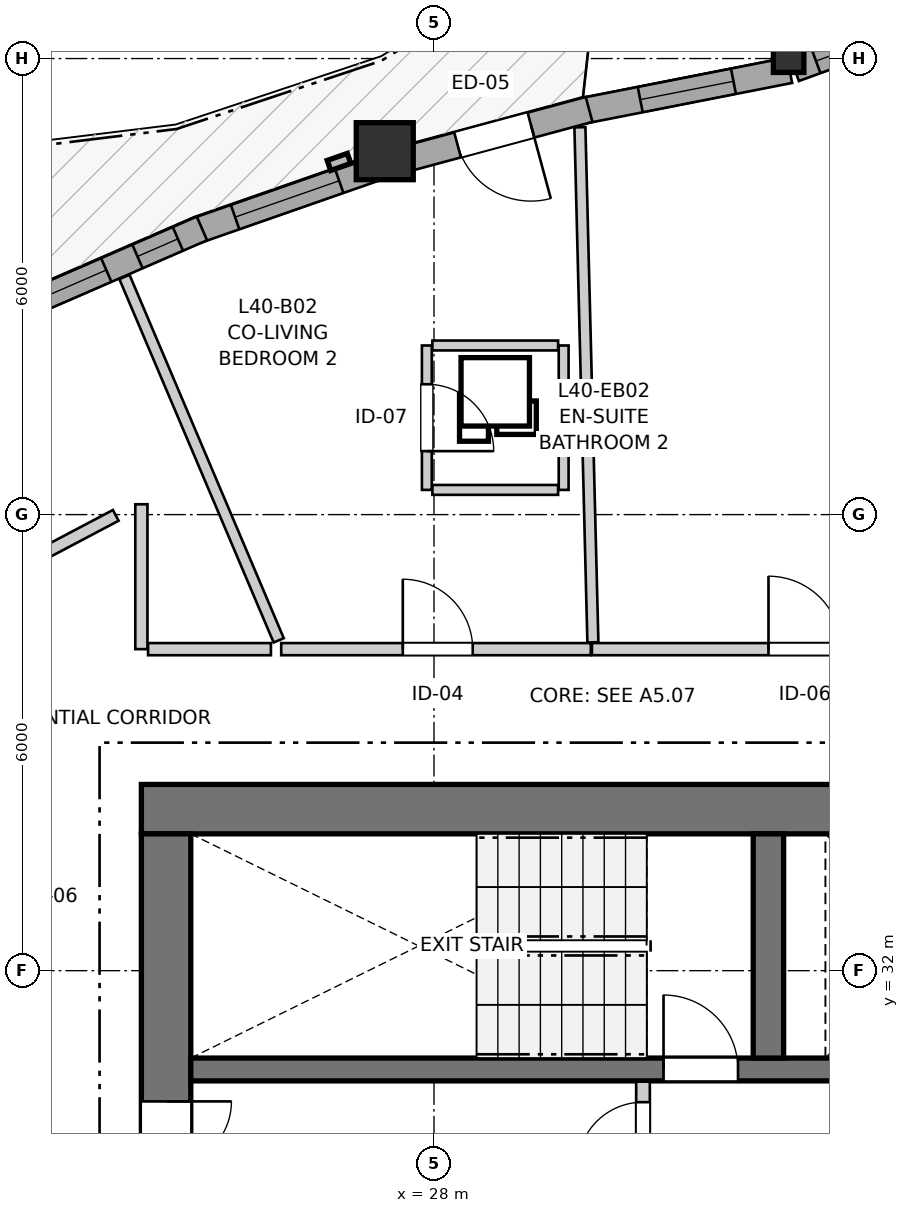
"""IFC4 building model, lengths in metres.
Left out: names, types, materials, properties, quantities, classifications, styles, units other than length and angle.
Written with IfcOpenShell. Run it as: python <this file> out.ifc"""

import sys

from ifc_helpers import new_model, si_unit, direction, frame, frame_2d, origin, origin_2d, place, context, subcontext, project, spatial, rectangle, i_section, extrude, source, transform, mapped, element, fill, save


model = new_model("IFC4")
c1 = context("Model", 3, precision=1e-05, world=origin(), true_north=direction((0.0, 1.0)))
c2 = subcontext(c1, "Body", "Model", "MODEL_VIEW")
j1 = project(units=[si_unit("LENGTHUNIT", "METRE"), si_unit("PLANEANGLEUNIT", "RADIAN")], contexts=[c1])
p1 = place(None, origin())
s1 = spatial("IfcSite", under=j1, at=p1, CompositionType="ELEMENT")
p2 = place(p1, origin())
s2 = spatial("IfcBuilding", under=s1, at=p2, CompositionType="ELEMENT")
p3 = place(p2, frame((0.0, 0.0, 136.2)))
s3 = spatial("IfcBuildingStorey", under=s2, at=p3, CompositionType="ELEMENT", Elevation=136.2)
p4 = place(p3, frame((36.55, 34.125, 0.0), z_axis=(0.0, 0.0, 1.0), x_axis=(-1.0, 0.0, 0.0)))
e1 = element("IfcWall", 1, at=p4, inside=s3, PredefinedType="SHEAR", context=c2, shape_type="SweptSolid", body=[
    extrude(rectangle(XDim=12.4, YDim=0.65, at=frame_2d((6.2, 0.0))), origin(), (0.0, 0.0, 1.0), 2.95),
])
p5 = place(p3, frame((24.475, 33.8, 0.0), z_axis=(0.0, 0.0, 1.0), x_axis=(0.0, -1.0, 0.0)))
e2 = element("IfcWall", 2, at=p5, inside=s3, PredefinedType="SHEAR", context=c2, shape_type="SweptSolid", body=[
    extrude(rectangle(XDim=15.6, YDim=0.65, at=frame_2d((7.8, 0.0))), origin(), (0.0, 0.0, 1.0), 2.95),
])
p6 = place(p5, frame((7.05, 0.0, 0.0)))
e3 = element("IfcOpeningElement", 3, at=p6, cuts=e2, PredefinedType="OPENING", context=c2, shape_type="SweptSolid", body=[
    extrude(rectangle(XDim=1.5, YDim=2.15, at=frame_2d((0.75, 1.075))), frame((0.0, 0.335, 0.0), z_axis=(0.0, -1.0, 0.0), x_axis=(1.0, 0.0, 0.0)), (0.0, 0.0, 1.0), 0.67),
])
p7 = place(p5, frame((3.52, 0.0, 0.0)))
e4 = element("IfcOpeningElement", 4, at=p7, cuts=e2, PredefinedType="OPENING", context=c2, shape_type="SweptSolid", body=[
    extrude(rectangle(XDim=0.86, YDim=2.05, at=frame_2d((0.43, 1.025))), frame((0.0, 0.335, 0.0), z_axis=(0.0, -1.0, 0.0), x_axis=(1.0, 0.0, 0.0)), (0.0, 0.0, 1.0), 0.67),
])
p8 = place(p5, frame((11.22, 0.0, 0.0)))
e5 = element("IfcOpeningElement", 5, at=p8, cuts=e2, PredefinedType="OPENING", context=c2, shape_type="SweptSolid", body=[
    extrude(rectangle(XDim=0.86, YDim=2.05, at=frame_2d((0.43, 1.025))), frame((0.0, 0.335, 0.0), z_axis=(0.0, -1.0, 0.0), x_axis=(1.0, 0.0, 0.0)), (0.0, 0.0, 1.0), 0.67),
])
p9 = place(p3, frame((24.8, 30.7, 0.0), z_axis=(0.0, 0.0, 1.0), x_axis=(1.0, 0.0, 0.0)))
e6 = element("IfcWall", 6, at=p9, inside=s3, PredefinedType="SHEAR", context=c2, shape_type="SweptSolid", body=[
    extrude(rectangle(XDim=11.1, YDim=0.3, at=frame_2d((5.55, 0.0))), origin(), (0.0, 0.0, 1.0), 2.95),
])
p10 = place(p9, frame((6.22, 0.0, 0.0)))
e7 = element("IfcOpeningElement", 7, at=p10, cuts=e6, PredefinedType="OPENING", context=c2, shape_type="SweptSolid", body=[
    extrude(rectangle(XDim=0.98, YDim=2.15, at=frame_2d((0.49, 1.075))), frame((0.0, 0.16, 0.0), z_axis=(0.0, -1.0, 0.0), x_axis=(1.0, 0.0, 0.0)), (0.0, 0.0, 1.0), 0.32),
])
p11 = place(p9, frame((9.15, 0.0, 0.0)))
e8 = element("IfcOpeningElement", 8, at=p11, cuts=e6, PredefinedType="OPENING", context=c2, shape_type="SweptSolid", body=[
    extrude(rectangle(XDim=1.15, YDim=2.15, at=frame_2d((0.575, 1.075))), frame((0.0, 0.16, 0.0), z_axis=(0.0, -1.0, 0.0), x_axis=(1.0, 0.0, 0.0)), (0.0, 0.0, 1.0), 0.32),
])
p12 = place(p3, frame((32.4, 30.85, 0.0), z_axis=(0.0, 0.0, 1.0), x_axis=(0.0, 1.0, 0.0)))
e9 = element("IfcWall", 9, at=p12, inside=s3, PredefinedType="SHEAR", context=c2, shape_type="SweptSolid", body=[
    extrude(rectangle(XDim=2.95, YDim=0.4, at=frame_2d((1.475, 0.0))), origin(), (0.0, 0.0, 1.0), 2.95),
])
m1 = source(origin(), c2, "Body", "SweptSolid", [
    extrude(i_section(OverallWidth=0.401, OverallDepth=0.399, WebThickness=0.023, FlangeThickness=0.036, FilletRadius=0.015, at=origin_2d()), origin(), (0.0, 0.0, 1.0), 2.95),
])
p13 = place(p3, frame((32.666, 44.017, 0.0), z_axis=(0.0, 0.0, 1.0), x_axis=(1.0, 0.0, 0.0)))
e10 = element("IfcColumn", 10, at=p13, inside=s3, PredefinedType="PILASTER", context=c2, shape_type="MappedRepresentation", body=[
    mapped(m1, transform((0.0, 0.0, 0.0), x_axis=(1.0, 0.0, 0.0), y_axis=(0.0, 1.0, 0.0), z_axis=(0.0, 0.0, 1.0), scale=1.0)),
])
m2 = source(origin(), c2, "Body", "SweptSolid", [
    extrude(rectangle(XDim=0.75, YDim=0.75, at=origin_2d()), origin(), (0.0, 0.0, 1.0), 2.95),
])
p14 = place(p3, frame((27.352, 42.781, 0.0), z_axis=(0.0, 0.0, 1.0), x_axis=(1.0, 0.0, 0.0)))
e11 = element("IfcColumn", 11, at=p14, inside=s3, PredefinedType="COLUMN", context=c2, shape_type="MappedRepresentation", body=[
    mapped(m2, transform((0.0, 0.0, 0.0), x_axis=(1.0, 0.0, 0.0), y_axis=(0.0, 1.0, 0.0), z_axis=(0.0, 0.0, 1.0), scale=1.0)),
])
p15 = place(p3, frame((34.644, 44.557, 0.0), z_axis=(0.0, 0.0, 1.0), x_axis=(-0.939440593615, -0.342711790092, 0.0)))
e12 = element("IfcWall", 12, at=p15, inside=s3, PredefinedType="SOLIDWALL", context=c2, shape_type="SweptSolid", body=[
    extrude(rectangle(XDim=2.023, YDim=0.34, at=frame_2d((1.012, 0.0))), origin(), (0.0, 0.0, 1.0), 2.53),
])
p16 = place(p15, frame((0.322, 0.0, 0.82)))
e13 = element("IfcOpeningElement", 13, at=p16, cuts=e12, PredefinedType="OPENING", context=c2, shape_type="SweptSolid", body=[
    extrude(rectangle(XDim=1.4, YDim=1.35, at=frame_2d((0.7, 0.675))), frame((0.0, 0.18, 0.0), z_axis=(0.0, -1.0, 0.0), x_axis=(1.0, 0.0, 0.0)), (0.0, 0.0, 1.0), 0.36),
])
p17 = place(p3, frame((32.679, 43.846, 0.0), z_axis=(0.0, 0.0, 1.0), x_axis=(-0.981247929568, -0.192749839736, 0.0)))
e14 = element("IfcWall", 14, at=p17, inside=s3, PredefinedType="SOLIDWALL", context=c2, shape_type="SweptSolid", body=[
    extrude(rectangle(XDim=2.776, YDim=0.34, at=frame_2d((1.388, 0.0))), origin(), (0.0, 0.0, 1.0), 2.53),
])
p18 = place(p17, frame((0.753, 0.0, 0.82)))
e15 = element("IfcOpeningElement", 15, at=p18, cuts=e14, PredefinedType="OPENING", context=c2, shape_type="SweptSolid", body=[
    extrude(rectangle(XDim=1.25, YDim=1.35, at=frame_2d((0.625, 0.675))), frame((0.0, 0.18, 0.0), z_axis=(0.0, -1.0, 0.0), x_axis=(1.0, 0.0, 0.0)), (0.0, 0.0, 1.0), 0.36),
])
p19 = place(p3, frame((30.04, 43.331, 0.0), z_axis=(0.0, 0.0, 1.0), x_axis=(-0.965460468502, -0.260549580233, 0.0)))
e16 = element("IfcWall", 16, at=p19, inside=s3, PredefinedType="SOLIDWALL", context=c2, shape_type="SweptSolid", body=[
    extrude(rectangle(XDim=2.583, YDim=0.34, at=frame_2d((1.292, 0.0))), origin(), (0.0, 0.0, 1.0), 2.53),
])
p20 = place(p19, frame((0.792, 0.0, 0.0)))
e17 = element("IfcOpeningElement", 17, at=p20, cuts=e16, PredefinedType="OPENING", context=c2, shape_type="SweptSolid", body=[
    extrude(rectangle(XDim=1.0, YDim=2.1, at=frame_2d((0.5, 1.05))), frame((0.0, 0.18, 0.0), z_axis=(0.0, -1.0, 0.0), x_axis=(1.0, 0.0, 0.0)), (0.0, 0.0, 1.0), 0.36),
])
p21 = place(p3, frame((27.262, 42.57, 0.0), z_axis=(0.0, 0.0, 1.0), x_axis=(-0.944148723561, -0.329519631884, 0.0)))
e18 = element("IfcWall", 18, at=p21, inside=s3, PredefinedType="SOLIDWALL", context=c2, shape_type="SweptSolid", body=[
    extrude(rectangle(XDim=2.54, YDim=0.34, at=frame_2d((1.27, 0.0))), origin(), (0.0, 0.0, 1.0), 2.53),
])
p22 = place(p21, frame((0.54, 0.0, 0.82)))
e19 = element("IfcOpeningElement", 19, at=p22, cuts=e18, PredefinedType="OPENING", context=c2, shape_type="SweptSolid", body=[
    extrude(rectangle(XDim=1.45, YDim=1.25, at=frame_2d((0.725, 0.625))), frame((0.0, 0.18, 0.0), z_axis=(0.0, -1.0, 0.0), x_axis=(1.0, 0.0, 0.0)), (0.0, 0.0, 1.0), 0.36),
])
p23 = place(p3, frame((24.947, 41.765, 0.0), z_axis=(0.0, 0.0, 1.0), x_axis=(-0.917074459221, -0.398715984435, 0.0)))
e20 = element("IfcWall", 20, at=p23, inside=s3, PredefinedType="SOLIDWALL", context=c2, shape_type="SweptSolid", body=[
    extrude(rectangle(XDim=2.645, YDim=0.34, at=frame_2d((1.322, 0.0))), origin(), (0.0, 0.0, 1.0), 2.53),
])
p24 = place(p23, frame((0.344, 0.0, 0.82)))
e21 = element("IfcOpeningElement", 21, at=p24, cuts=e20, PredefinedType="OPENING", context=c2, shape_type="SweptSolid", body=[
    extrude(rectangle(XDim=0.58, YDim=1.35, at=frame_2d((0.29, 0.675))), frame((0.0, 0.18, 0.0), z_axis=(0.0, -1.0, 0.0), x_axis=(1.0, 0.0, 0.0)), (0.0, 0.0, 1.0), 0.36),
])
p25 = place(p23, frame((1.372, 0.0, 0.82)))
e22 = element("IfcOpeningElement", 22, at=p25, cuts=e20, PredefinedType="OPENING", context=c2, shape_type="SweptSolid", body=[
    extrude(rectangle(XDim=0.95, YDim=1.35, at=frame_2d((0.475, 0.675))), frame((0.0, 0.18, 0.0), z_axis=(0.0, -1.0, 0.0), x_axis=(1.0, 0.0, 0.0)), (0.0, 0.0, 1.0), 0.36),
])
p26 = place(p3, frame((30.75, 27.43, 0.0), z_axis=(0.0, 0.0, 1.0), x_axis=(0.0, 1.0, 0.0)))
e23 = element("IfcWall", 23, at=p26, inside=s3, PredefinedType="PARTITIONING", context=c2, shape_type="SweptSolid", body=[
    extrude(rectangle(XDim=3.11, YDim=0.18, at=frame_2d((1.555, 0.0))), origin(), (0.0, 0.0, 1.0), 2.95),
])
p27 = place(p26, frame((1.98, 0.0, 0.0)))
e24 = element("IfcOpeningElement", 24, at=p27, cuts=e23, PredefinedType="OPENING", context=c2, shape_type="SweptSolid", body=[
    extrude(rectangle(XDim=0.86, YDim=2.05, at=frame_2d((0.43, 1.025))), frame((0.0, 0.1, 0.0), z_axis=(0.0, -1.0, 0.0), x_axis=(1.0, 0.0, 0.0)), (0.0, 0.0, 1.0), 0.2),
])
p28 = place(p3, frame((30.078, 36.23, 0.0), z_axis=(0.0, 0.0, 1.0), x_axis=(1.0, 0.0, 0.0)))
e25 = element("IfcWall", 25, at=p28, inside=s3, PredefinedType="PARTITIONING", context=c2, shape_type="SweptSolid", body=[
    extrude(rectangle(XDim=5.608, YDim=0.16, at=frame_2d((2.804, 0.0))), origin(), (0.0, 0.0, 1.0), 2.588),
])
p29 = place(p28, frame((2.323, 0.0, 0.0)))
e26 = element("IfcOpeningElement", 26, at=p29, cuts=e25, PredefinedType="OPENING", context=c2, shape_type="SweptSolid", body=[
    extrude(rectangle(XDim=0.96, YDim=2.1, at=frame_2d((0.48, 1.05))), frame((0.0, 0.09, 0.0), z_axis=(0.0, -1.0, 0.0), x_axis=(1.0, 0.0, 0.0)), (0.0, 0.0, 1.0), 0.18),
])
p30 = place(p3, frame((25.99, 36.23, 0.0), z_axis=(0.0, 0.0, 1.0), x_axis=(1.0, 0.0, 0.0)))
e27 = element("IfcWall", 27, at=p30, inside=s3, PredefinedType="PARTITIONING", context=c2, shape_type="SweptSolid", body=[
    extrude(rectangle(XDim=4.073, YDim=0.16, at=frame_2d((2.037, 0.0))), origin(), (0.0, 0.0, 1.0), 2.95),
])
p31 = place(p30, frame((1.6, 0.0, 0.0)))
e28 = element("IfcOpeningElement", 28, at=p31, cuts=e27, PredefinedType="OPENING", context=c2, shape_type="SweptSolid", body=[
    extrude(rectangle(XDim=0.92, YDim=2.1, at=frame_2d((0.46, 1.05))), frame((0.0, 0.09, 0.0), z_axis=(0.0, -1.0, 0.0), x_axis=(1.0, 0.0, 0.0)), (0.0, 0.0, 1.0), 0.18),
])
p32 = place(p3, frame((27.906, 40.225, 0.0), z_axis=(0.0, 0.0, 1.0), x_axis=(0.0, -1.0, 0.0)))
e29 = element("IfcWall", 29, at=p32, inside=s3, PredefinedType="PARTITIONING", context=c2, shape_type="SweptSolid", body=[
    extrude(rectangle(XDim=1.9, YDim=0.13, at=frame_2d((0.95, 0.0))), origin(), (0.0, 0.0, 1.0), 2.318),
])
p33 = place(p32, frame((0.51, 0.0, 0.0)))
e30 = element("IfcOpeningElement", 30, at=p33, cuts=e29, PredefinedType="OPENING", context=c2, shape_type="SweptSolid", body=[
    extrude(rectangle(XDim=0.88, YDim=2.05, at=frame_2d((0.44, 1.025))), frame((0.0, 0.075, 0.0), z_axis=(0.0, -1.0, 0.0), x_axis=(1.0, 0.0, 0.0)), (0.0, 0.0, 1.0), 0.15),
])
p34 = place(p3, frame((29.92, 43.096, 0.0), z_axis=(0.0, 0.0, 1.0), x_axis=(0.025211755772, -0.999682133166, 0.0)))
e31 = element("IfcWall", 31, at=p34, inside=s3, PredefinedType="PARTITIONING", context=c2, shape_type="SweptSolid", body=[
    extrude(rectangle(XDim=6.779, YDim=0.145, at=frame_2d((3.389, 0.0))), origin(), (0.0, 0.0, 1.0), 2.95),
])
p35 = place(p3, frame((23.927, 41.127, 0.0), z_axis=(0.0, 0.0, 1.0), x_axis=(0.39073452171, -0.920503413108, 0.0)))
e32 = element("IfcWall", 32, at=p35, inside=s3, PredefinedType="PARTITIONING", context=c2, shape_type="SweptSolid", body=[
    extrude(rectangle(XDim=5.194, YDim=0.145, at=frame_2d((2.597, 0.0))), origin(), (0.0, 0.0, 1.0), 2.95),
])
p36 = place(p3, frame((24.15, 36.23, 0.0), z_axis=(0.0, 0.0, 1.0), x_axis=(0.0, 1.0, 0.0)))
e33 = element("IfcWall", 33, at=p36, inside=s3, PredefinedType="PARTITIONING", context=c2, shape_type="SweptSolid", body=[
    extrude(rectangle(XDim=1.906, YDim=0.16, at=frame_2d((0.953, 0.0))), origin(), (0.0, 0.0, 1.0), 2.95),
])
p37 = place(p3, frame((29.706, 38.325, 0.0), z_axis=(0.0, 0.0, 1.0), x_axis=(0.0, 1.0, 0.0)))
e34 = element("IfcWall", 34, at=p37, inside=s3, PredefinedType="PARTITIONING", context=c2, shape_type="SweptSolid", body=[
    extrude(rectangle(XDim=1.9, YDim=0.13, at=frame_2d((0.95, 0.0))), origin(), (0.0, 0.0, 1.0), 2.95),
])
p38 = place(p3, frame((24.238, 36.23, 0.0), z_axis=(0.0, 0.0, 1.0), x_axis=(1.0, 0.0, 0.0)))
e35 = element("IfcWall", 35, at=p38, inside=s3, PredefinedType="PARTITIONING", context=c2, shape_type="SweptSolid", body=[
    extrude(rectangle(XDim=1.616, YDim=0.16, at=frame_2d((0.808, 0.0))), origin(), (0.0, 0.0, 1.0), 2.95),
])
p39 = place(p3, frame((27.979, 40.225, 0.0), z_axis=(0.0, 0.0, 1.0), x_axis=(1.0, 0.0, 0.0)))
e36 = element("IfcWall", 36, at=p39, inside=s3, PredefinedType="PARTITIONING", context=c2, shape_type="SweptSolid", body=[
    extrude(rectangle(XDim=1.654, YDim=0.13, at=frame_2d((0.827, 0.0))), origin(), (0.0, 0.0, 1.0), 2.558),
])
p40 = place(p3, frame((27.979, 38.325, 0.0), z_axis=(0.0, 0.0, 1.0), x_axis=(1.0, 0.0, 0.0)))
e37 = element("IfcWall", 37, at=p40, inside=s3, PredefinedType="PARTITIONING", context=c2, shape_type="SweptSolid", body=[
    extrude(rectangle(XDim=1.654, YDim=0.13, at=frame_2d((0.827, 0.0))), origin(), (0.0, 0.0, 1.0), 2.95),
])
p41 = place(p3, frame((22.37, 37.228, 0.0), z_axis=(0.0, 0.0, 1.0), x_axis=(0.884271493782, 0.466973152638, 0.0)))
e38 = element("IfcWall", 38, at=p41, inside=s3, PredefinedType="PARTITIONING", context=c2, shape_type="SweptSolid", body=[
    extrude(rectangle(XDim=1.632, YDim=0.16, at=frame_2d((0.816, 0.0))), origin(), (0.0, 0.0, 1.0), 2.558),
])
m3 = source(origin(), c2, "Body", "SweptSolid", [
    extrude(rectangle(XDim=1.4, YDim=1.35, at=frame_2d((0.7, 0.675))), frame((0.0, 0.03, 0.0), z_axis=(0.0, -1.0, 0.0), x_axis=(1.0, 0.0, 0.0)), (0.0, 0.0, 1.0), 0.06),
])
p42 = place(p16, origin())
e39 = element("IfcWindow", 39, at=p42, inside=s3, PartitioningType="SINGLE_PANEL", PredefinedType="WINDOW", context=c2, shape_type="MappedRepresentation", body=[
    mapped(m3, transform((0.0, 0.0, 0.0), x_axis=(1.0, 0.0, 0.0), y_axis=(0.0, 1.0, 0.0), z_axis=(0.0, 0.0, 1.0), scale=1.0)),
])
fill(e13, e39)
m4 = source(origin(), c2, "Body", "SweptSolid", [
    extrude(rectangle(XDim=1.25, YDim=1.35, at=frame_2d((0.625, 0.675))), frame((0.0, 0.03, 0.0), z_axis=(0.0, -1.0, 0.0), x_axis=(1.0, 0.0, 0.0)), (0.0, 0.0, 1.0), 0.06),
])
p43 = place(p18, origin())
e40 = element("IfcWindow", 40, at=p43, inside=s3, PartitioningType="SINGLE_PANEL", PredefinedType="WINDOW", context=c2, shape_type="MappedRepresentation", body=[
    mapped(m4, transform((0.0, 0.0, 0.0), x_axis=(1.0, 0.0, 0.0), y_axis=(0.0, 1.0, 0.0), z_axis=(0.0, 0.0, 1.0), scale=1.0)),
])
fill(e15, e40)
m5 = source(origin(), c2, "Body", "SweptSolid", [
    extrude(rectangle(XDim=1.45, YDim=1.25, at=frame_2d((0.725, 0.625))), frame((0.0, 0.03, 0.0), z_axis=(0.0, -1.0, 0.0), x_axis=(1.0, 0.0, 0.0)), (0.0, 0.0, 1.0), 0.06),
])
p44 = place(p22, origin())
e41 = element("IfcWindow", 41, at=p44, inside=s3, PartitioningType="SINGLE_PANEL", PredefinedType="WINDOW", context=c2, shape_type="MappedRepresentation", body=[
    mapped(m5, transform((0.0, 0.0, 0.0), x_axis=(1.0, 0.0, 0.0), y_axis=(0.0, 1.0, 0.0), z_axis=(0.0, 0.0, 1.0), scale=1.0)),
])
fill(e19, e41)
m6 = source(origin(), c2, "Body", "SweptSolid", [
    extrude(rectangle(XDim=0.58, YDim=1.35, at=frame_2d((0.29, 0.675))), frame((0.0, 0.03, 0.0), z_axis=(0.0, -1.0, 0.0), x_axis=(1.0, 0.0, 0.0)), (0.0, 0.0, 1.0), 0.06),
])
p45 = place(p24, origin())
e42 = element("IfcWindow", 42, at=p45, inside=s3, PartitioningType="SINGLE_PANEL", PredefinedType="WINDOW", context=c2, shape_type="MappedRepresentation", body=[
    mapped(m6, transform((0.0, 0.0, 0.0), x_axis=(1.0, 0.0, 0.0), y_axis=(0.0, 1.0, 0.0), z_axis=(0.0, 0.0, 1.0), scale=1.0)),
])
fill(e21, e42)
m7 = source(origin(), c2, "Body", "SweptSolid", [
    extrude(rectangle(XDim=0.95, YDim=1.35, at=frame_2d((0.475, 0.675))), frame((0.0, 0.03, 0.0), z_axis=(0.0, -1.0, 0.0), x_axis=(1.0, 0.0, 0.0)), (0.0, 0.0, 1.0), 0.06),
])
p46 = place(p25, origin())
e43 = element("IfcWindow", 43, at=p46, inside=s3, PartitioningType="SINGLE_PANEL", PredefinedType="WINDOW", context=c2, shape_type="MappedRepresentation", body=[
    mapped(m7, transform((0.0, 0.0, 0.0), x_axis=(1.0, 0.0, 0.0), y_axis=(0.0, 1.0, 0.0), z_axis=(0.0, 0.0, 1.0), scale=1.0)),
])
fill(e22, e43)
m8 = source(origin(), c2, "Body", "SweptSolid", [
    extrude(rectangle(XDim=1.0, YDim=2.1, at=frame_2d((0.5, 1.05))), frame((0.0, 0.025, 0.0), z_axis=(0.0, -1.0, 0.0), x_axis=(1.0, 0.0, 0.0)), (0.0, 0.0, 1.0), 0.05),
])
p47 = place(p20, origin())
e44 = element("IfcDoor", 44, at=p47, inside=s3, OperationType="SINGLE_SWING_LEFT", PredefinedType="DOOR", context=c2, shape_type="MappedRepresentation", body=[
    mapped(m8, transform((0.0, 0.0, 0.0), x_axis=(1.0, 0.0, 0.0), y_axis=(0.0, 1.0, 0.0), z_axis=(0.0, 0.0, 1.0), scale=1.0)),
])
fill(e17, e44)
m9 = source(origin(), c2, "Body", "SweptSolid", [
    extrude(rectangle(XDim=0.98, YDim=2.15, at=frame_2d((0.49, 1.075))), frame((0.0, 0.025, 0.0), z_axis=(0.0, -1.0, 0.0), x_axis=(1.0, 0.0, 0.0)), (0.0, 0.0, 1.0), 0.05),
])
p48 = place(p10, origin())
e45 = element("IfcDoor", 45, at=p48, inside=s3, OperationType="SINGLE_SWING_LEFT", PredefinedType="DOOR", context=c2, shape_type="MappedRepresentation", body=[
    mapped(m9, transform((0.0, 0.0, 0.0), x_axis=(1.0, 0.0, 0.0), y_axis=(0.0, 1.0, 0.0), z_axis=(0.0, 0.0, 1.0), scale=1.0)),
])
fill(e7, e45)
m10 = source(origin(), c2, "Body", "SweptSolid", [
    extrude(rectangle(XDim=0.86, YDim=2.05, at=frame_2d((0.43, 1.025))), frame((0.0, 0.025, 0.0), z_axis=(0.0, -1.0, 0.0), x_axis=(1.0, 0.0, 0.0)), (0.0, 0.0, 1.0), 0.05),
])
p49 = place(p7, origin())
e46 = element("IfcDoor", 46, at=p49, inside=s3, OperationType="SINGLE_SWING_LEFT", PredefinedType="DOOR", context=c2, shape_type="MappedRepresentation", body=[
    mapped(m10, transform((0.0, 0.0, 0.0), x_axis=(1.0, 0.0, 0.0), y_axis=(0.0, 1.0, 0.0), z_axis=(0.0, 0.0, 1.0), scale=1.0)),
])
fill(e4, e46)
p50 = place(p27, origin())
e47 = element("IfcDoor", 47, at=p50, inside=s3, OperationType="SINGLE_SWING_LEFT", PredefinedType="DOOR", context=c2, shape_type="MappedRepresentation", body=[
    mapped(m10, transform((0.0, 0.0, 0.0), x_axis=(1.0, 0.0, 0.0), y_axis=(0.0, 1.0, 0.0), z_axis=(0.0, 0.0, 1.0), scale=1.0)),
])
fill(e24, e47)
m11 = source(origin(), c2, "Body", "SweptSolid", [
    extrude(rectangle(XDim=0.96, YDim=2.1, at=frame_2d((0.48, 1.05))), frame((0.0, 0.025, 0.0), z_axis=(0.0, -1.0, 0.0), x_axis=(1.0, 0.0, 0.0)), (0.0, 0.0, 1.0), 0.05),
])
p51 = place(p29, origin())
e48 = element("IfcDoor", 48, at=p51, inside=s3, OperationType="SINGLE_SWING_LEFT", PredefinedType="DOOR", context=c2, shape_type="MappedRepresentation", body=[
    mapped(m11, transform((0.0, 0.0, 0.0), x_axis=(1.0, 0.0, 0.0), y_axis=(0.0, 1.0, 0.0), z_axis=(0.0, 0.0, 1.0), scale=1.0)),
])
fill(e26, e48)
m12 = source(origin(), c2, "Body", "SweptSolid", [
    extrude(rectangle(XDim=0.92, YDim=2.1, at=frame_2d((0.46, 1.05))), frame((0.0, 0.025, 0.0), z_axis=(0.0, -1.0, 0.0), x_axis=(1.0, 0.0, 0.0)), (0.0, 0.0, 1.0), 0.05),
])
p52 = place(p31, origin())
e49 = element("IfcDoor", 49, at=p52, inside=s3, OperationType="SINGLE_SWING_LEFT", PredefinedType="DOOR", context=c2, shape_type="MappedRepresentation", body=[
    mapped(m12, transform((0.0, 0.0, 0.0), x_axis=(1.0, 0.0, 0.0), y_axis=(0.0, 1.0, 0.0), z_axis=(0.0, 0.0, 1.0), scale=1.0)),
])
fill(e28, e49)
m13 = source(origin(), c2, "Body", "SweptSolid", [
    extrude(rectangle(XDim=0.88, YDim=2.05, at=frame_2d((0.44, 1.025))), frame((0.0, 0.025, 0.0), z_axis=(0.0, -1.0, 0.0), x_axis=(1.0, 0.0, 0.0)), (0.0, 0.0, 1.0), 0.05),
])
p53 = place(p33, origin())
e50 = element("IfcDoor", 50, at=p53, inside=s3, OperationType="SINGLE_SWING_RIGHT", PredefinedType="DOOR", context=c2, shape_type="MappedRepresentation", body=[
    mapped(m13, transform((0.0, 0.0, 0.0), x_axis=(1.0, 0.0, 0.0), y_axis=(0.0, 1.0, 0.0), z_axis=(0.0, 0.0, 1.0), scale=1.0)),
])
fill(e30, e50)
save(model, sys.argv[1])
